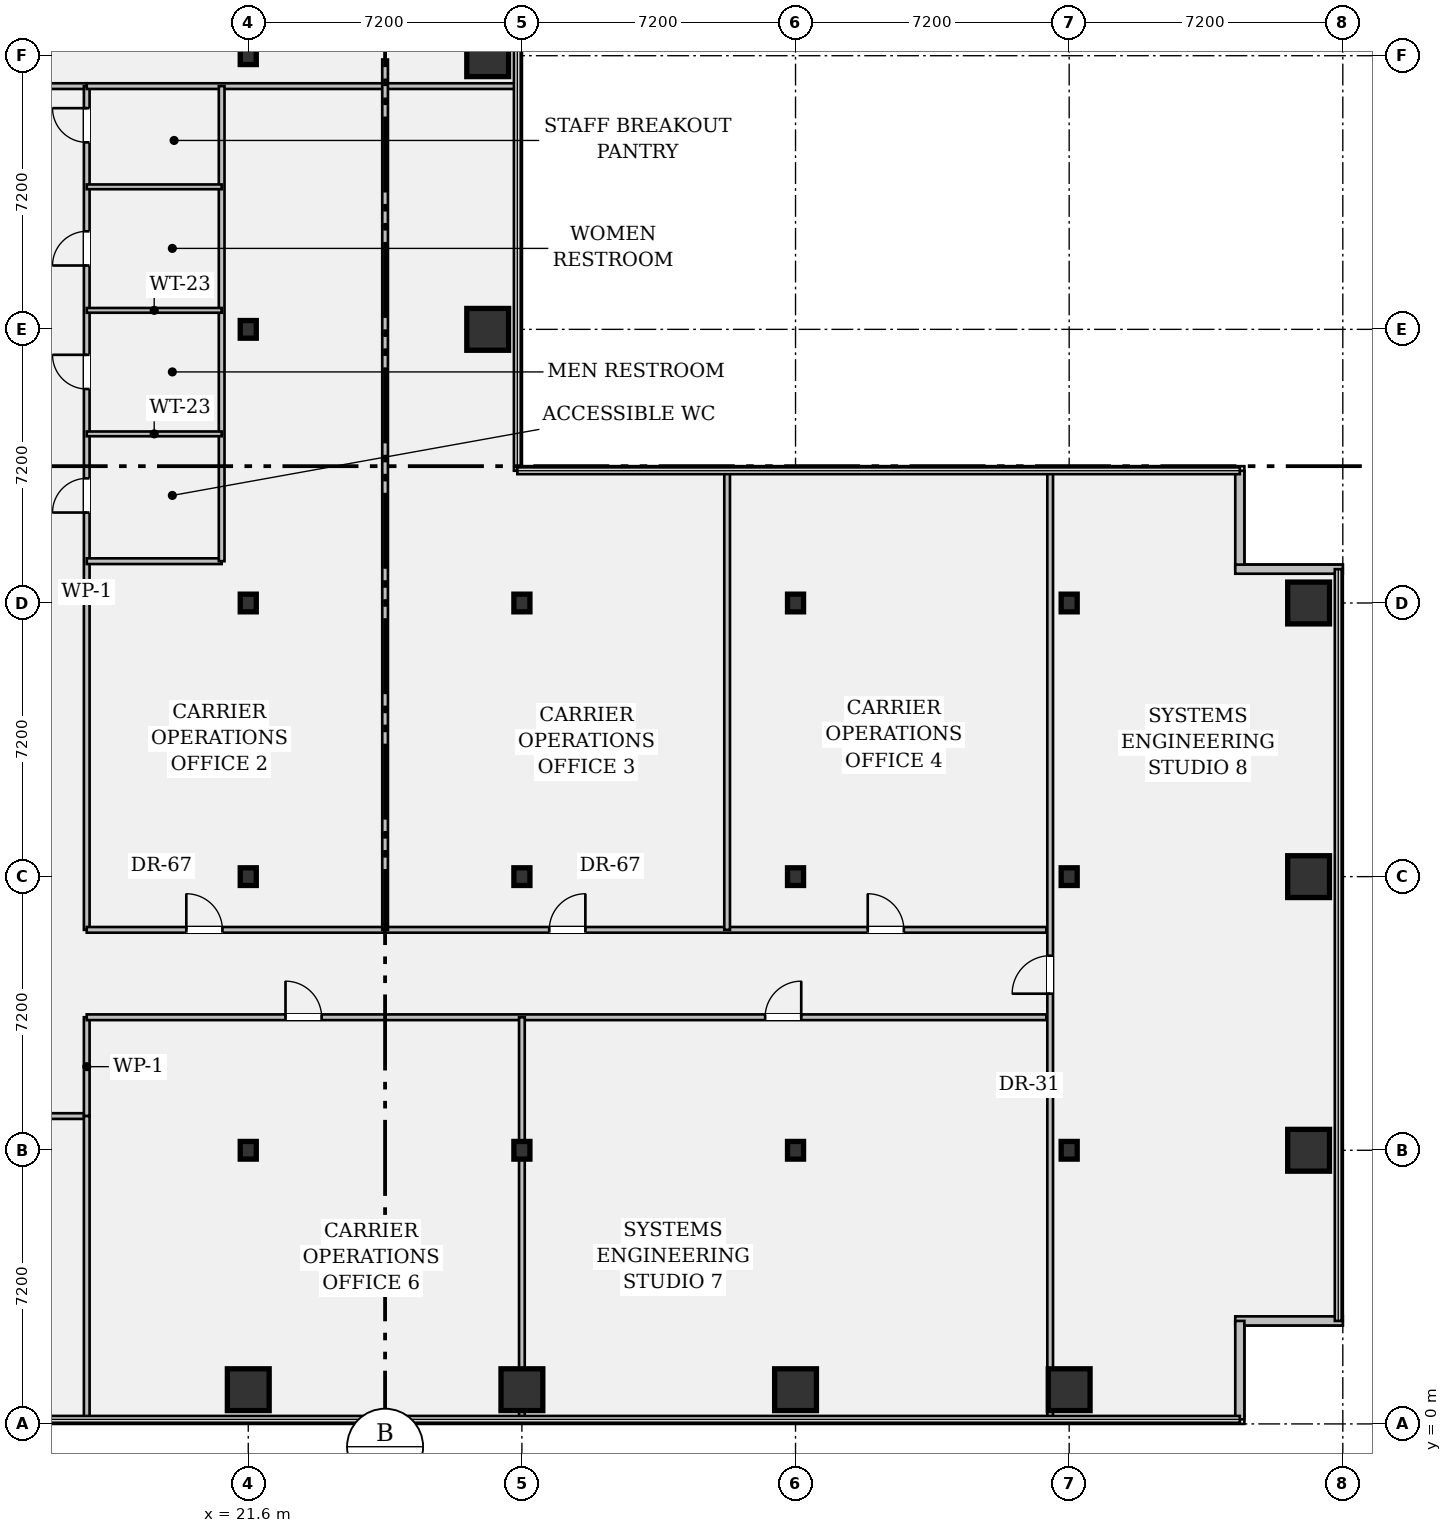
"""IFC4 building model, lengths in metres.
Left out: names, types, materials, properties, quantities, classifications, styles, units other than length and angle.
Written with IfcOpenShell. Run it as: python <this file> out.ifc"""

import sys

from ifc_helpers import new_model, si_unit, direction, frame, frame_2d, origin, origin_2d, place, context, subcontext, project, spatial, rectangle, hollow_rectangle, i_section, extrude, element, fill, save


model = new_model("IFC4")
c1 = context("Model", 3, precision=1e-05, world=origin(), true_north=direction((0.0, 1.0)))
c2 = subcontext(c1, "Body", "Model", "MODEL_VIEW")
j1 = project(units=[si_unit("LENGTHUNIT", "METRE"), si_unit("PLANEANGLEUNIT", "RADIAN")], contexts=[c1])
p1 = place(None, origin())
s1 = spatial("IfcSite", under=j1, at=p1, CompositionType="ELEMENT")
p2 = place(p1, origin())
s2 = spatial("IfcBuilding", under=s1, at=p2, CompositionType="ELEMENT")
p3 = place(p2, frame((0.0, 0.0, 38.85)))
s3 = spatial("IfcBuildingStorey", under=s2, at=p3, CompositionType="ELEMENT", Elevation=38.85)
p4 = place(p3, frame((21.6, 0.9, 0.0), z_axis=(0.0, 0.0, 1.0), x_axis=(1.0, 0.0, 0.0)))
e1 = element("IfcColumn", 1, at=p4, inside=s3, PredefinedType="COLUMN", context=c2, shape_type="SweptSolid", body=[
    extrude(hollow_rectangle(XDim=1.1, YDim=1.1, WallThickness=0.07, at=origin_2d()), origin(), (0.0, 0.0, 1.0), 3.57),
])
for number, where, z_axis, x_axis in (
    (2, (21.6, 7.2, 0.0), (0.0, 0.0, 1.0), (1.0, 0.0, 0.0)),
    (3, (21.6, 14.4, 0.0), (0.0, 0.0, 1.0), (1.0, 0.0, 0.0)),
    (4, (21.6, 21.6, 0.0), (0.0, 0.0, 1.0), (1.0, 0.0, 0.0)),
    (5, (21.6, 28.8, 0.0), (0.0, 0.0, 1.0), (1.0, 0.0, 0.0)),
    (6, (21.6, 36.0, 0.0), (0.0, 0.0, 1.0), (1.0, 0.0, 0.0)),
):
    element("IfcColumn", number, at=place(p3, frame(where, z_axis=z_axis, x_axis=x_axis)), inside=s3, PredefinedType="COLUMN", context=c2, shape_type="SweptSolid", body=[
        extrude(i_section(OverallWidth=0.422, OverallDepth=0.465, WebThickness=0.045, FlangeThickness=0.073, FilletRadius=0.018, at=origin_2d()), origin(), (0.0, 0.0, 1.0), 3.57),
    ])
for number, where, z_axis, x_axis in (
    (7, (27.9, 28.8, 0.0), (0.0, 0.0, 1.0), (1.0, 0.0, 0.0)),
    (8, (27.9, 36.0, 0.0), (0.0, 0.0, 1.0), (1.0, 0.0, 0.0)),
    (9, (28.8, 0.9, 0.0), (0.0, 0.0, 1.0), (1.0, 0.0, 0.0)),
):
    element("IfcColumn", number, at=place(p3, frame(where, z_axis=z_axis, x_axis=x_axis)), inside=s3, PredefinedType="COLUMN", context=c2, shape_type="SweptSolid", body=[
        extrude(hollow_rectangle(XDim=1.1, YDim=1.1, WallThickness=0.07, at=origin_2d()), origin(), (0.0, 0.0, 1.0), 3.57),
    ])
for number, where, z_axis, x_axis in (
    (10, (28.8, 7.2, 0.0), (0.0, 0.0, 1.0), (1.0, 0.0, 0.0)),
    (11, (28.8, 14.4, 0.0), (0.0, 0.0, 1.0), (1.0, 0.0, 0.0)),
    (12, (28.8, 21.6, 0.0), (0.0, 0.0, 1.0), (1.0, 0.0, 0.0)),
):
    element("IfcColumn", number, at=place(p3, frame(where, z_axis=z_axis, x_axis=x_axis)), inside=s3, PredefinedType="COLUMN", context=c2, shape_type="SweptSolid", body=[
        extrude(i_section(OverallWidth=0.422, OverallDepth=0.465, WebThickness=0.045, FlangeThickness=0.073, FilletRadius=0.018, at=origin_2d()), origin(), (0.0, 0.0, 1.0), 3.57),
    ])
p5 = place(p3, frame((36.0, 0.9, 0.0), z_axis=(0.0, 0.0, 1.0), x_axis=(1.0, 0.0, 0.0)))
e13 = element("IfcColumn", 13, at=p5, inside=s3, PredefinedType="COLUMN", context=c2, shape_type="SweptSolid", body=[
    extrude(hollow_rectangle(XDim=1.1, YDim=1.1, WallThickness=0.07, at=origin_2d()), origin(), (0.0, 0.0, 1.0), 3.57),
])
for number, where, z_axis, x_axis in (
    (14, (36.0, 7.2, 0.0), (0.0, 0.0, 1.0), (1.0, 0.0, 0.0)),
    (15, (36.0, 14.4, 0.0), (0.0, 0.0, 1.0), (1.0, 0.0, 0.0)),
    (16, (36.0, 21.6, 0.0), (0.0, 0.0, 1.0), (1.0, 0.0, 0.0)),
):
    element("IfcColumn", number, at=place(p3, frame(where, z_axis=z_axis, x_axis=x_axis)), inside=s3, PredefinedType="COLUMN", context=c2, shape_type="SweptSolid", body=[
        extrude(i_section(OverallWidth=0.422, OverallDepth=0.465, WebThickness=0.045, FlangeThickness=0.073, FilletRadius=0.018, at=origin_2d()), origin(), (0.0, 0.0, 1.0), 3.57),
    ])
p6 = place(p3, frame((43.2, 0.9, 0.0), z_axis=(0.0, 0.0, 1.0), x_axis=(1.0, 0.0, 0.0)))
e17 = element("IfcColumn", 17, at=p6, inside=s3, PredefinedType="COLUMN", context=c2, shape_type="SweptSolid", body=[
    extrude(hollow_rectangle(XDim=1.1, YDim=1.1, WallThickness=0.07, at=origin_2d()), origin(), (0.0, 0.0, 1.0), 3.57),
])
for number, where, z_axis, x_axis in (
    (18, (43.2, 7.2, 0.0), (0.0, 0.0, 1.0), (1.0, 0.0, 0.0)),
    (19, (43.2, 14.4, 0.0), (0.0, 0.0, 1.0), (1.0, 0.0, 0.0)),
    (20, (43.2, 21.6, 0.0), (0.0, 0.0, 1.0), (1.0, 0.0, 0.0)),
):
    element("IfcColumn", number, at=place(p3, frame(where, z_axis=z_axis, x_axis=x_axis)), inside=s3, PredefinedType="COLUMN", context=c2, shape_type="SweptSolid", body=[
        extrude(i_section(OverallWidth=0.422, OverallDepth=0.465, WebThickness=0.045, FlangeThickness=0.073, FilletRadius=0.018, at=origin_2d()), origin(), (0.0, 0.0, 1.0), 3.57),
    ])
for number, where, z_axis, x_axis in (
    (21, (49.5, 7.2, 0.0), (0.0, 0.0, 1.0), (1.0, 0.0, 0.0)),
    (22, (49.5, 14.4, 0.0), (0.0, 0.0, 1.0), (1.0, 0.0, 0.0)),
    (23, (49.5, 21.6, 0.0), (0.0, 0.0, 1.0), (1.0, 0.0, 0.0)),
):
    element("IfcColumn", number, at=place(p3, frame(where, z_axis=z_axis, x_axis=x_axis)), inside=s3, PredefinedType="COLUMN", context=c2, shape_type="SweptSolid", body=[
        extrude(hollow_rectangle(XDim=1.1, YDim=1.1, WallThickness=0.07, at=origin_2d()), origin(), (0.0, 0.0, 1.0), 3.57),
    ])
p7 = place(p3, frame((47.69, 25.08, 0.0), z_axis=(0.0, 0.0, 1.0), x_axis=(0.0, -1.0, 0.0)))
e24 = element("IfcWall", 24, at=p7, inside=s3, PredefinedType="STANDARD", context=c2, shape_type="SweptSolid", body=[
    extrude(rectangle(XDim=2.59, YDim=0.24, at=frame_2d((1.295, 0.0))), origin(), (0.0, 0.0, 1.0), 3.57),
])
for number, where, z_axis, x_axis in (
    (25, (47.57, 22.49, 0.0), (0.0, 0.0, 1.0), (1.0, 0.0, 0.0)),
    (26, (50.4, 2.71, 0.0), (0.0, 0.0, 1.0), (-1.0, 0.0, 0.0)),
):
    element("IfcWall", number, at=place(p3, frame(where, z_axis=z_axis, x_axis=x_axis)), inside=s3, PredefinedType="STANDARD", context=c2, shape_type="SweptSolid", body=[
        extrude(rectangle(XDim=2.83, YDim=0.24, at=frame_2d((1.415, 0.0))), origin(), (0.0, 0.0, 1.0), 3.57),
    ])
p8 = place(p3, frame((47.69, 2.71, 0.0), z_axis=(0.0, 0.0, 1.0), x_axis=(0.0, -1.0, 0.0)))
e27 = element("IfcWall", 27, at=p8, inside=s3, PredefinedType="STANDARD", context=c2, shape_type="SweptSolid", body=[
    extrude(rectangle(XDim=2.59, YDim=0.24, at=frame_2d((1.295, 0.0))), origin(), (0.0, 0.0, 1.0), 3.57),
])
p9 = place(p3, frame((14.4, 8.1, 0.0), z_axis=(0.0, 0.0, 1.0), x_axis=(1.0, 0.0, 0.0)))
e28 = element("IfcWall", 28, at=p9, inside=s3, PredefinedType="PARTITIONING", context=c2, shape_type="SweptSolid", body=[
    extrude(rectangle(XDim=2.95, YDim=0.15, at=frame_2d((1.475, 0.0))), origin(), (0.0, 0.0, 1.0), 2.628),
])
p10 = place(p9, frame((0.95, 0.0, 0.0)))
e29 = element("IfcOpeningElement", 29, at=p10, cuts=e28, PredefinedType="OPENING", context=c2, shape_type="SweptSolid", body=[
    extrude(rectangle(XDim=0.95, YDim=2.15, at=frame_2d((0.475, 1.075))), frame((0.0, 0.087, 0.0), z_axis=(0.0, -1.0, 0.0), x_axis=(1.0, 0.0, 0.0)), (0.0, 0.0, 1.0), 0.174),
])
p11 = place(p3, frame((14.4, 35.2, 0.0), z_axis=(0.0, 0.0, 1.0), x_axis=(1.0, 0.0, 0.0)))
e30 = element("IfcWall", 30, at=p11, inside=s3, PredefinedType="PARTITIONING", context=c2, shape_type="SweptSolid", body=[
    extrude(rectangle(XDim=2.95, YDim=0.15, at=frame_2d((1.475, 0.0))), origin(), (0.0, 0.0, 1.0), 2.628),
])
p12 = place(p11, frame((0.95, 0.0, 0.0)))
e31 = element("IfcOpeningElement", 31, at=p12, cuts=e30, PredefinedType="OPENING", context=c2, shape_type="SweptSolid", body=[
    extrude(rectangle(XDim=1.0, YDim=2.15, at=frame_2d((0.5, 1.075))), frame((0.0, 0.087, 0.0), z_axis=(0.0, -1.0, 0.0), x_axis=(1.0, 0.0, 0.0)), (0.0, 0.0, 1.0), 0.174),
])
p13 = place(p3, frame((17.35, 8.1, 0.0), z_axis=(0.0, 0.0, 1.0), x_axis=(0.0, 1.0, 0.0)))
e32 = element("IfcWall", 32, at=p13, inside=s3, PredefinedType="PARTITIONING", context=c2, shape_type="SweptSolid", body=[
    extrude(rectangle(XDim=2.6, YDim=0.15, at=frame_2d((1.3, 0.0))), origin(), (0.0, 0.0, 1.0), 3.57),
])
p14 = place(p3, frame((17.35, 13.0, 0.0), z_axis=(0.0, 0.0, 1.0), x_axis=(0.0, 1.0, 0.0)))
e33 = element("IfcWall", 33, at=p14, inside=s3, PredefinedType="PARTITIONING", context=c2, shape_type="SweptSolid", body=[
    extrude(rectangle(XDim=22.2, YDim=0.15, at=frame_2d((11.1, 0.0))), origin(), (0.0, 0.0, 1.0), 2.628),
])
p15 = place(p14, frame((10.98, 0.0, 0.0)))
e34 = element("IfcOpeningElement", 34, at=p15, cuts=e33, PredefinedType="OPENING", context=c2, shape_type="SweptSolid", body=[
    extrude(rectangle(XDim=0.9, YDim=2.15, at=frame_2d((0.45, 1.075))), frame((0.0, 0.087, 0.0), z_axis=(0.0, -1.0, 0.0), x_axis=(1.0, 0.0, 0.0)), (0.0, 0.0, 1.0), 0.174),
])
p16 = place(p14, frame((14.23, 0.0, 0.0)))
e35 = element("IfcOpeningElement", 35, at=p16, cuts=e33, PredefinedType="OPENING", context=c2, shape_type="SweptSolid", body=[
    extrude(rectangle(XDim=0.9, YDim=2.15, at=frame_2d((0.45, 1.075))), frame((0.0, 0.087, 0.0), z_axis=(0.0, -1.0, 0.0), x_axis=(1.0, 0.0, 0.0)), (0.0, 0.0, 1.0), 0.174),
])
p17 = place(p14, frame((17.48, 0.0, 0.0)))
e36 = element("IfcOpeningElement", 36, at=p17, cuts=e33, PredefinedType="OPENING", context=c2, shape_type="SweptSolid", body=[
    extrude(rectangle(XDim=0.9, YDim=2.15, at=frame_2d((0.45, 1.075))), frame((0.0, 0.087, 0.0), z_axis=(0.0, -1.0, 0.0), x_axis=(1.0, 0.0, 0.0)), (0.0, 0.0, 1.0), 0.174),
])
p18 = place(p14, frame((20.72, 0.0, 0.0)))
e37 = element("IfcOpeningElement", 37, at=p18, cuts=e33, PredefinedType="OPENING", context=c2, shape_type="SweptSolid", body=[
    extrude(rectangle(XDim=0.9, YDim=2.15, at=frame_2d((0.45, 1.075))), frame((0.0, 0.087, 0.0), z_axis=(0.0, -1.0, 0.0), x_axis=(1.0, 0.0, 0.0)), (0.0, 0.0, 1.0), 0.174),
])
p19 = place(p3, frame((17.35, 10.7, 0.0), z_axis=(0.0, 0.0, 1.0), x_axis=(1.0, 0.0, 0.0)))
e38 = element("IfcWall", 38, at=p19, inside=s3, PredefinedType="PARTITIONING", context=c2, shape_type="SweptSolid", body=[
    extrude(rectangle(XDim=25.25, YDim=0.15, at=frame_2d((12.625, 0.0))), origin(), (0.0, 0.0, 1.0), 2.628),
])
p20 = place(p19, frame((5.23, 0.0, 0.0)))
e39 = element("IfcOpeningElement", 39, at=p20, cuts=e38, PredefinedType="OPENING", context=c2, shape_type="SweptSolid", body=[
    extrude(rectangle(XDim=0.95, YDim=2.15, at=frame_2d((0.475, 1.075))), frame((0.0, 0.087, 0.0), z_axis=(0.0, -1.0, 0.0), x_axis=(1.0, 0.0, 0.0)), (0.0, 0.0, 1.0), 0.174),
])
p21 = place(p19, frame((17.85, 0.0, 0.0)))
e40 = element("IfcOpeningElement", 40, at=p21, cuts=e38, PredefinedType="OPENING", context=c2, shape_type="SweptSolid", body=[
    extrude(rectangle(XDim=0.95, YDim=2.15, at=frame_2d((0.475, 1.075))), frame((0.0, 0.087, 0.0), z_axis=(0.0, -1.0, 0.0), x_axis=(1.0, 0.0, 0.0)), (0.0, 0.0, 1.0), 0.174),
])
p22 = place(p3, frame((17.35, 13.0, 0.0), z_axis=(0.0, 0.0, 1.0), x_axis=(1.0, 0.0, 0.0)))
e41 = element("IfcWall", 41, at=p22, inside=s3, PredefinedType="PARTITIONING", context=c2, shape_type="SweptSolid", body=[
    extrude(rectangle(XDim=25.25, YDim=0.15, at=frame_2d((12.625, 0.0))), origin(), (0.0, 0.0, 1.0), 2.628),
])
p23 = place(p22, frame((2.62, 0.0, 0.0)))
e42 = element("IfcOpeningElement", 42, at=p23, cuts=e41, PredefinedType="OPENING", context=c2, shape_type="SweptSolid", body=[
    extrude(rectangle(XDim=0.95, YDim=2.15, at=frame_2d((0.475, 1.075))), frame((0.0, 0.087, 0.0), z_axis=(0.0, -1.0, 0.0), x_axis=(1.0, 0.0, 0.0)), (0.0, 0.0, 1.0), 0.174),
])
p24 = place(p22, frame((12.17, 0.0, 0.0)))
e43 = element("IfcOpeningElement", 43, at=p24, cuts=e41, PredefinedType="OPENING", context=c2, shape_type="SweptSolid", body=[
    extrude(rectangle(XDim=0.95, YDim=2.15, at=frame_2d((0.475, 1.075))), frame((0.0, 0.087, 0.0), z_axis=(0.0, -1.0, 0.0), x_axis=(1.0, 0.0, 0.0)), (0.0, 0.0, 1.0), 0.174),
])
p25 = place(p22, frame((20.55, 0.0, 0.0)))
e44 = element("IfcOpeningElement", 44, at=p25, cuts=e41, PredefinedType="OPENING", context=c2, shape_type="SweptSolid", body=[
    extrude(rectangle(XDim=0.95, YDim=2.15, at=frame_2d((0.475, 1.075))), frame((0.0, 0.087, 0.0), z_axis=(0.0, -1.0, 0.0), x_axis=(1.0, 0.0, 0.0)), (0.0, 0.0, 1.0), 0.174),
])
p26 = place(p3, frame((42.7, 0.12, 0.0), z_axis=(0.0, 0.0, 1.0), x_axis=(0.0, 1.0, 0.0)))
e45 = element("IfcWall", 45, at=p26, inside=s3, PredefinedType="PARTITIONING", context=c2, shape_type="SweptSolid", body=[
    extrude(rectangle(XDim=24.96, YDim=0.15, at=frame_2d((12.48, 0.0))), origin(), (0.0, 0.0, 1.0), 2.628),
])
p27 = place(p26, frame((11.2, 0.0, 0.0)))
e46 = element("IfcOpeningElement", 46, at=p27, cuts=e45, PredefinedType="OPENING", context=c2, shape_type="SweptSolid", body=[
    extrude(rectangle(XDim=1.0, YDim=2.15, at=frame_2d((0.5, 1.075))), frame((0.0, 0.087, 0.0), z_axis=(0.0, -1.0, 0.0), x_axis=(1.0, 0.0, 0.0)), (0.0, 0.0, 1.0), 0.174),
])
p28 = place(p3, frame((17.35, 35.2, 0.0), z_axis=(0.0, 0.0, 1.0), x_axis=(1.0, 0.0, 0.0)))
e47 = element("IfcWall", 47, at=p28, inside=s3, PredefinedType="PARTITIONING", context=c2, shape_type="SweptSolid", body=[
    extrude(rectangle(XDim=11.33, YDim=0.15, at=frame_2d((5.665, 0.0))), origin(), (0.0, 0.0, 1.0), 2.628),
])
p29 = place(p3, frame((17.35, 22.7, 0.0), z_axis=(0.0, 0.0, 1.0), x_axis=(1.0, 0.0, 0.0)))
e48 = element("IfcWall", 48, at=p29, inside=s3, PredefinedType="PARTITIONING", context=c2, shape_type="SweptSolid", body=[
    extrude(rectangle(XDim=3.55, YDim=0.15, at=frame_2d((1.775, 0.0))), origin(), (0.0, 0.0, 1.0), 3.088),
])
p30 = place(p3, frame((20.9, 22.7, 0.0), z_axis=(0.0, 0.0, 1.0), x_axis=(0.0, 1.0, 0.0)))
e49 = element("IfcWall", 49, at=p30, inside=s3, PredefinedType="PARTITIONING", context=c2, shape_type="SweptSolid", body=[
    extrude(rectangle(XDim=12.5, YDim=0.15, at=frame_2d((6.25, 0.0))), origin(), (0.0, 0.0, 1.0), 2.628),
])
for number, where, z_axis, x_axis in (
    (50, (17.35, 26.05, 0.0), (0.0, 0.0, 1.0), (1.0, 0.0, 0.0)),
    (51, (17.35, 29.3, 0.0), (0.0, 0.0, 1.0), (1.0, 0.0, 0.0)),
    (52, (17.35, 32.55, 0.0), (0.0, 0.0, 1.0), (1.0, 0.0, 0.0)),
):
    element("IfcWall", number, at=place(p3, frame(where, z_axis=z_axis, x_axis=x_axis)), inside=s3, PredefinedType="PARTITIONING", context=c2, shape_type="SweptSolid", body=[
        extrude(rectangle(XDim=3.55, YDim=0.125, at=frame_2d((1.775, 0.0))), origin(), (0.0, 0.0, 1.0), 3.088),
    ])
p31 = place(p3, frame((25.2, 13.0, 0.0), z_axis=(0.0, 0.0, 1.0), x_axis=(0.0, 1.0, 0.0)))
e53 = element("IfcWall", 53, at=p31, inside=s3, PredefinedType="PARTITIONING", context=c2, shape_type="SweptSolid", body=[
    extrude(rectangle(XDim=22.9, YDim=0.15, at=frame_2d((11.45, 0.0))), origin(), (0.0, 0.0, 1.0), 2.628),
])
p32 = place(p3, frame((34.2, 13.0, 0.0), z_axis=(0.0, 0.0, 1.0), x_axis=(0.0, 1.0, 0.0)))
e54 = element("IfcWall", 54, at=p32, inside=s3, PredefinedType="PARTITIONING", context=c2, shape_type="SweptSolid", body=[
    extrude(rectangle(XDim=12.05, YDim=0.15, at=frame_2d((6.025, 0.0))), origin(), (0.0, 0.0, 1.0), 2.628),
])
p33 = place(p3, frame((17.35, 0.12, 0.0), z_axis=(0.0, 0.0, 1.0), x_axis=(0.0, 1.0, 0.0)))
e55 = element("IfcWall", 55, at=p33, inside=s3, PredefinedType="PARTITIONING", context=c2, shape_type="SweptSolid", body=[
    extrude(rectangle(XDim=7.98, YDim=0.15, at=frame_2d((3.99, 0.0))), origin(), (0.0, 0.0, 1.0), 2.628),
])
p34 = place(p3, frame((28.8, 0.12, 0.0), z_axis=(0.0, 0.0, 1.0), x_axis=(0.0, 1.0, 0.0)))
e56 = element("IfcWall", 56, at=p34, inside=s3, PredefinedType="PARTITIONING", context=c2, shape_type="SweptSolid", body=[
    extrude(rectangle(XDim=10.58, YDim=0.15, at=frame_2d((5.29, 0.0))), origin(), (0.0, 0.0, 1.0), 2.628),
])
p35 = place(p15, origin())
e57 = element("IfcDoor", 57, at=p35, inside=s3, OperationType="SINGLE_SWING_LEFT", PredefinedType="DOOR", context=c2, shape_type="SweptSolid", body=[
    extrude(rectangle(XDim=0.9, YDim=2.15, at=frame_2d((0.45, 1.075))), frame((0.0, 0.025, 0.0), z_axis=(0.0, -1.0, 0.0), x_axis=(1.0, 0.0, 0.0)), (0.0, 0.0, 1.0), 0.05),
])
fill(e34, e57)
p36 = place(p16, origin())
e58 = element("IfcDoor", 58, at=p36, inside=s3, OperationType="SINGLE_SWING_RIGHT", PredefinedType="DOOR", context=c2, shape_type="SweptSolid", body=[
    extrude(rectangle(XDim=0.9, YDim=2.15, at=frame_2d((0.45, 1.075))), frame((0.0, 0.025, 0.0), z_axis=(0.0, -1.0, 0.0), x_axis=(1.0, 0.0, 0.0)), (0.0, 0.0, 1.0), 0.05),
])
fill(e35, e58)
p37 = place(p17, origin())
e59 = element("IfcDoor", 59, at=p37, inside=s3, OperationType="SINGLE_SWING_LEFT", PredefinedType="DOOR", context=c2, shape_type="SweptSolid", body=[
    extrude(rectangle(XDim=0.9, YDim=2.15, at=frame_2d((0.45, 1.075))), frame((0.0, 0.025, 0.0), z_axis=(0.0, -1.0, 0.0), x_axis=(1.0, 0.0, 0.0)), (0.0, 0.0, 1.0), 0.05),
])
fill(e36, e59)
p38 = place(p18, origin())
e60 = element("IfcDoor", 60, at=p38, inside=s3, OperationType="SINGLE_SWING_RIGHT", PredefinedType="DOOR", context=c2, shape_type="SweptSolid", body=[
    extrude(rectangle(XDim=0.9, YDim=2.15, at=frame_2d((0.45, 1.075))), frame((0.0, 0.025, 0.0), z_axis=(0.0, -1.0, 0.0), x_axis=(1.0, 0.0, 0.0)), (0.0, 0.0, 1.0), 0.05),
])
fill(e37, e60)
p39 = place(p23, origin())
e61 = element("IfcDoor", 61, at=p39, inside=s3, OperationType="SINGLE_SWING_LEFT", PredefinedType="DOOR", context=c2, shape_type="SweptSolid", body=[
    extrude(rectangle(XDim=0.95, YDim=2.15, at=frame_2d((0.475, 1.075))), frame((0.0, 0.025, 0.0), z_axis=(0.0, -1.0, 0.0), x_axis=(1.0, 0.0, 0.0)), (0.0, 0.0, 1.0), 0.05),
])
fill(e42, e61)
p40 = place(p24, origin())
e62 = element("IfcDoor", 62, at=p40, inside=s3, OperationType="SINGLE_SWING_RIGHT", PredefinedType="DOOR", context=c2, shape_type="SweptSolid", body=[
    extrude(rectangle(XDim=0.95, YDim=2.15, at=frame_2d((0.475, 1.075))), frame((0.0, 0.025, 0.0), z_axis=(0.0, -1.0, 0.0), x_axis=(1.0, 0.0, 0.0)), (0.0, 0.0, 1.0), 0.05),
])
fill(e43, e62)
p41 = place(p25, origin())
e63 = element("IfcDoor", 63, at=p41, inside=s3, OperationType="SINGLE_SWING_LEFT", PredefinedType="DOOR", context=c2, shape_type="SweptSolid", body=[
    extrude(rectangle(XDim=0.95, YDim=2.15, at=frame_2d((0.475, 1.075))), frame((0.0, 0.025, 0.0), z_axis=(0.0, -1.0, 0.0), x_axis=(1.0, 0.0, 0.0)), (0.0, 0.0, 1.0), 0.05),
])
fill(e44, e63)
p42 = place(p20, origin())
e64 = element("IfcDoor", 64, at=p42, inside=s3, OperationType="SINGLE_SWING_LEFT", PredefinedType="DOOR", context=c2, shape_type="SweptSolid", body=[
    extrude(rectangle(XDim=0.95, YDim=2.15, at=frame_2d((0.475, 1.075))), frame((0.0, 0.025, 0.0), z_axis=(0.0, -1.0, 0.0), x_axis=(1.0, 0.0, 0.0)), (0.0, 0.0, 1.0), 0.05),
])
fill(e39, e64)
p43 = place(p21, origin())
e65 = element("IfcDoor", 65, at=p43, inside=s3, OperationType="SINGLE_SWING_RIGHT", PredefinedType="DOOR", context=c2, shape_type="SweptSolid", body=[
    extrude(rectangle(XDim=0.95, YDim=2.15, at=frame_2d((0.475, 1.075))), frame((0.0, 0.025, 0.0), z_axis=(0.0, -1.0, 0.0), x_axis=(1.0, 0.0, 0.0)), (0.0, 0.0, 1.0), 0.05),
])
fill(e40, e65)
p44 = place(p27, origin())
e66 = element("IfcDoor", 66, at=p44, inside=s3, OperationType="SINGLE_SWING_LEFT", PredefinedType="DOOR", context=c2, shape_type="SweptSolid", body=[
    extrude(rectangle(XDim=1.0, YDim=2.15, at=frame_2d((0.5, 1.075))), frame((0.0, 0.025, 0.0), z_axis=(0.0, -1.0, 0.0), x_axis=(1.0, 0.0, 0.0)), (0.0, 0.0, 1.0), 0.05),
])
fill(e46, e66)
save(model, sys.argv[1])
